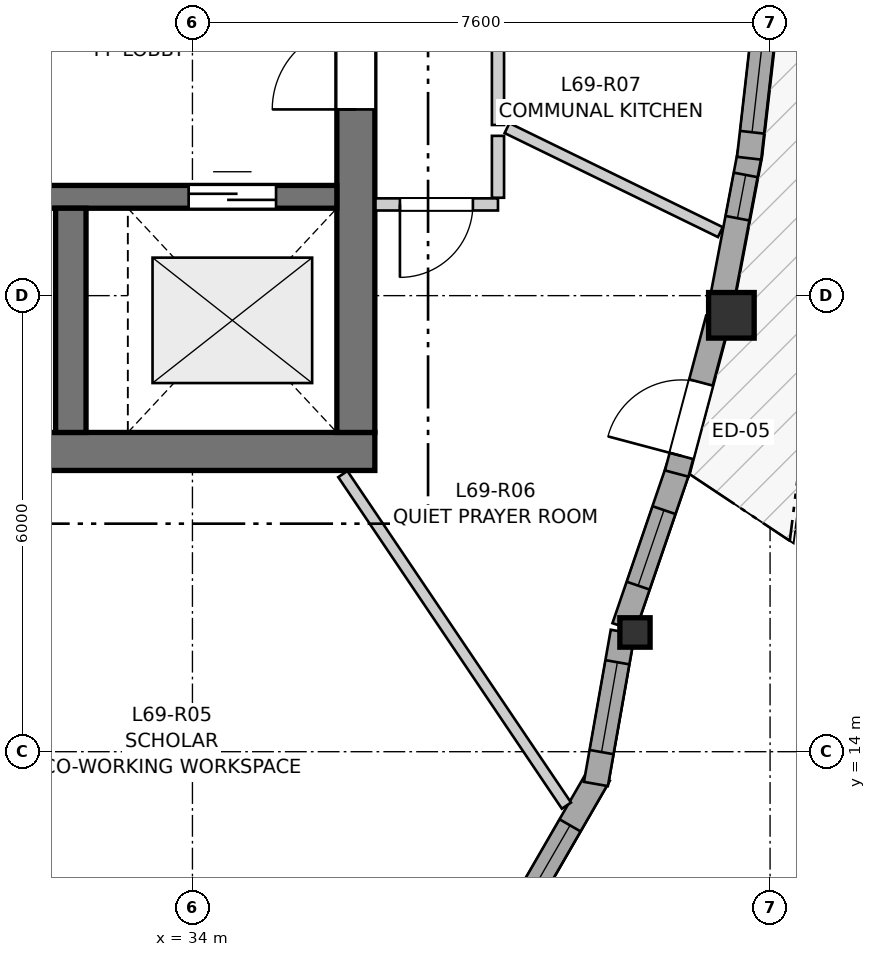
"""IFC4 building model, lengths in metres.
Left out: names, types, materials, properties, quantities, classifications, styles, units other than length and angle.
Written with IfcOpenShell. Run it as: python <this file> out.ifc"""

import sys

from ifc_helpers import new_model, si_unit, direction, frame, frame_2d, origin, origin_2d, place, context, subcontext, project, spatial, rectangle, i_section, extrude, source, transform, mapped, element, fill, save


model = new_model("IFC4")
c1 = context("Model", 3, precision=1e-05, world=origin(), true_north=direction((0.0, 1.0)))
c2 = subcontext(c1, "Body", "Model", "MODEL_VIEW")
j1 = project(units=[si_unit("LENGTHUNIT", "METRE"), si_unit("PLANEANGLEUNIT", "RADIAN")], contexts=[c1])
p1 = place(None, origin())
s1 = spatial("IfcSite", under=j1, at=p1, CompositionType="ELEMENT")
p2 = place(p1, origin())
s2 = spatial("IfcBuilding", under=s1, at=p2, CompositionType="ELEMENT")
p3 = place(p2, frame((0.0, 0.0, 230.8)))
s3 = spatial("IfcBuildingStorey", under=s2, at=p3, CompositionType="ELEMENT", Elevation=230.8)
p4 = place(p3, frame((24.3, 17.95, 0.0), z_axis=(0.0, 0.0, 1.0), x_axis=(1.0, 0.0, 0.0)))
e1 = element("IfcWall", 1, at=p4, inside=s3, PredefinedType="SHEAR", context=c2, shape_type="SweptSolid", body=[
    extrude(rectangle(XDim=12.1, YDim=0.5, at=frame_2d((6.05, 0.0))), origin(), (0.0, 0.0, 1.0), 2.96),
])
p5 = place(p3, frame((36.15, 18.2, 0.0), z_axis=(0.0, 0.0, 1.0), x_axis=(0.0, 1.0, 0.0)))
e2 = element("IfcWall", 2, at=p5, inside=s3, PredefinedType="SHEAR", context=c2, shape_type="SweptSolid", body=[
    extrude(rectangle(XDim=15.6, YDim=0.5, at=frame_2d((7.8, 0.0))), origin(), (0.0, 0.0, 1.0), 2.96),
])
p6 = place(p5, frame((4.25, 0.0, 0.0)))
e3 = element("IfcOpeningElement", 3, at=p6, cuts=e2, PredefinedType="OPENING", context=c2, shape_type="SweptSolid", body=[
    extrude(rectangle(XDim=1.1, YDim=2.15, at=frame_2d((0.55, 1.075))), frame((0.0, 0.26, 0.0), z_axis=(0.0, -1.0, 0.0), x_axis=(1.0, 0.0, 0.0)), (0.0, 0.0, 1.0), 0.52),
])
p7 = place(p5, frame((10.25, 0.0, 0.0)))
e4 = element("IfcOpeningElement", 4, at=p7, cuts=e2, PredefinedType="OPENING", context=c2, shape_type="SweptSolid", body=[
    extrude(rectangle(XDim=1.1, YDim=2.15, at=frame_2d((0.55, 1.075))), frame((0.0, 0.26, 0.0), z_axis=(0.0, -1.0, 0.0), x_axis=(1.0, 0.0, 0.0)), (0.0, 0.0, 1.0), 0.52),
])
p8 = place(p3, frame((24.8, 21.3, 0.0), z_axis=(0.0, 0.0, 1.0), x_axis=(1.0, 0.0, 0.0)))
e5 = element("IfcWall", 5, at=p8, inside=s3, PredefinedType="SHEAR", context=c2, shape_type="SweptSolid", body=[
    extrude(rectangle(XDim=11.1, YDim=0.3, at=frame_2d((5.55, 0.0))), origin(), (0.0, 0.0, 1.0), 2.96),
])
p9 = place(p8, frame((6.22, 0.0, 0.0)))
e6 = element("IfcOpeningElement", 6, at=p9, cuts=e5, PredefinedType="OPENING", context=c2, shape_type="SweptSolid", body=[
    extrude(rectangle(XDim=0.98, YDim=2.15, at=frame_2d((0.49, 1.075))), frame((0.0, 0.16, 0.0), z_axis=(0.0, -1.0, 0.0), x_axis=(1.0, 0.0, 0.0)), (0.0, 0.0, 1.0), 0.32),
])
p10 = place(p8, frame((9.15, 0.0, 0.0)))
e7 = element("IfcOpeningElement", 7, at=p10, cuts=e5, PredefinedType="OPENING", context=c2, shape_type="SweptSolid", body=[
    extrude(rectangle(XDim=1.15, YDim=2.15, at=frame_2d((0.575, 1.075))), frame((0.0, 0.16, 0.0), z_axis=(0.0, -1.0, 0.0), x_axis=(1.0, 0.0, 0.0)), (0.0, 0.0, 1.0), 0.32),
])
p11 = place(p3, frame((32.4, 18.2, 0.0), z_axis=(0.0, 0.0, 1.0), x_axis=(0.0, 1.0, 0.0)))
e8 = element("IfcWall", 8, at=p11, inside=s3, PredefinedType="SHEAR", context=c2, shape_type="SweptSolid", body=[
    extrude(rectangle(XDim=2.95, YDim=0.4, at=frame_2d((1.475, 0.0))), origin(), (0.0, 0.0, 1.0), 2.96),
])
m1 = source(origin(), c2, "Body", "SweptSolid", [
    extrude(i_section(OverallWidth=0.398, OverallDepth=0.387, WebThickness=0.019, FlangeThickness=0.03, FilletRadius=0.015, at=origin_2d()), origin(), (0.0, 0.0, 1.0), 2.96),
])
p12 = place(p3, frame((39.823, 15.569, 0.0), z_axis=(0.0, 0.0, 1.0), x_axis=(1.0, 0.0, 0.0)))
e9 = element("IfcColumn", 9, at=p12, inside=s3, PredefinedType="PILASTER", context=c2, shape_type="MappedRepresentation", body=[
    mapped(m1, transform((0.0, 0.0, 0.0), x_axis=(1.0, 0.0, 0.0), y_axis=(0.0, 1.0, 0.0), z_axis=(0.0, 0.0, 1.0), scale=1.0)),
])
m2 = source(origin(), c2, "Body", "SweptSolid", [
    extrude(rectangle(XDim=0.6, YDim=0.6, at=origin_2d()), origin(), (0.0, 0.0, 1.0), 2.96),
])
p13 = place(p3, frame((41.091, 19.741, 0.0), z_axis=(0.0, 0.0, 1.0), x_axis=(1.0, 0.0, 0.0)))
e10 = element("IfcColumn", 10, at=p13, inside=s3, PredefinedType="COLUMN", context=c2, shape_type="MappedRepresentation", body=[
    mapped(m2, transform((0.0, 0.0, 0.0), x_axis=(1.0, 0.0, 0.0), y_axis=(0.0, 1.0, 0.0), z_axis=(0.0, 0.0, 1.0), scale=1.0)),
])
p14 = place(p3, frame((38.308, 11.888, 0.0), z_axis=(0.0, 0.0, 1.0), x_axis=(0.49990781971, 0.866078617559, 0.0)))
e11 = element("IfcWall", 11, at=p14, inside=s3, PredefinedType="SOLIDWALL", context=c2, shape_type="SweptSolid", body=[
    extrude(rectangle(XDim=2.09, YDim=0.32, at=frame_2d((1.045, 0.0))), origin(), (0.0, 0.0, 1.0), 2.58),
])
p15 = place(p14, frame((0.271, 0.0, 0.82)))
e12 = element("IfcOpeningElement", 12, at=p15, cuts=e11, PredefinedType="OPENING", context=c2, shape_type="SweptSolid", body=[
    extrude(rectangle(XDim=1.05, YDim=1.45, at=frame_2d((0.525, 0.725))), frame((0.0, 0.17, 0.0), z_axis=(0.0, -1.0, 0.0), x_axis=(1.0, 0.0, 0.0)), (0.0, 0.0, 1.0), 0.34),
])
p16 = place(p3, frame((39.309, 13.575, 0.0), z_axis=(0.0, 0.0, 1.0), x_axis=(0.17370309897, 0.984798067326, 0.0)))
e13 = element("IfcWall", 13, at=p16, inside=s3, PredefinedType="SOLIDWALL", context=c2, shape_type="SweptSolid", body=[
    extrude(rectangle(XDim=2.032, YDim=0.32, at=frame_2d((1.016, 0.0))), origin(), (0.0, 0.0, 1.0), 2.58),
])
p17 = place(p16, frame((0.426, 0.0, 0.82)))
e14 = element("IfcOpeningElement", 14, at=p17, cuts=e13, PredefinedType="OPENING", context=c2, shape_type="SweptSolid", body=[
    extrude(rectangle(XDim=1.2, YDim=1.45, at=frame_2d((0.6, 0.725))), frame((0.0, 0.17, 0.0), z_axis=(0.0, -1.0, 0.0), x_axis=(1.0, 0.0, 0.0)), (0.0, 0.0, 1.0), 0.34),
])
p18 = place(p3, frame((39.677, 15.639, 0.0), z_axis=(0.0, 0.0, 1.0), x_axis=(0.323664392341, 0.946171951143, 0.0)))
e15 = element("IfcWall", 15, at=p18, inside=s3, PredefinedType="SOLIDWALL", context=c2, shape_type="SweptSolid", body=[
    extrude(rectangle(XDim=2.223, YDim=0.32, at=frame_2d((1.111, 0.0))), origin(), (0.0, 0.0, 1.0), 2.58),
])
p19 = place(p18, frame((0.576, 0.0, 0.82)))
e16 = element("IfcOpeningElement", 16, at=p19, cuts=e15, PredefinedType="OPENING", context=c2, shape_type="SweptSolid", body=[
    extrude(rectangle(XDim=1.05, YDim=1.45, at=frame_2d((0.525, 0.725))), frame((0.0, 0.17, 0.0), z_axis=(0.0, -1.0, 0.0), x_axis=(1.0, 0.0, 0.0)), (0.0, 0.0, 1.0), 0.34),
])
p20 = place(p3, frame((40.372, 17.659, 0.0), z_axis=(0.0, 0.0, 1.0), x_axis=(0.2570422776, 0.966400159109, 0.0)))
e17 = element("IfcWall", 17, at=p20, inside=s3, PredefinedType="SOLIDWALL", context=c2, shape_type="SweptSolid", body=[
    extrude(rectangle(XDim=2.107, YDim=0.32, at=frame_2d((1.053, 0.0))), origin(), (0.0, 0.0, 1.0), 2.58),
])
p21 = place(p20, frame((0.24, 0.0, 0.0)))
e18 = element("IfcOpeningElement", 18, at=p21, cuts=e17, PredefinedType="OPENING", context=c2, shape_type="SweptSolid", body=[
    extrude(rectangle(XDim=1.0, YDim=2.1, at=frame_2d((0.5, 1.05))), frame((0.0, 0.17, 0.0), z_axis=(0.0, -1.0, 0.0), x_axis=(1.0, 0.0, 0.0)), (0.0, 0.0, 1.0), 0.34),
])
p22 = place(p3, frame((40.95, 19.86, 0.0), z_axis=(0.0, 0.0, 1.0), x_axis=(0.18667884524, 0.982420993638, 0.0)))
e19 = element("IfcWall", 19, at=p22, inside=s3, PredefinedType="SOLIDWALL", context=c2, shape_type="SweptSolid", body=[
    extrude(rectangle(XDim=2.072, YDim=0.32, at=frame_2d((1.036, 0.0))), origin(), (0.0, 0.0, 1.0), 2.58),
])
p23 = place(p22, frame((1.18, 0.0, 0.82)))
e20 = element("IfcOpeningElement", 20, at=p23, cuts=e19, PredefinedType="OPENING", context=c2, shape_type="SweptSolid", body=[
    extrude(rectangle(XDim=0.58, YDim=1.35, at=frame_2d((0.29, 0.675))), frame((0.0, 0.17, 0.0), z_axis=(0.0, -1.0, 0.0), x_axis=(1.0, 0.0, 0.0)), (0.0, 0.0, 1.0), 0.34),
])
p24 = place(p3, frame((41.324, 21.808, 0.0), z_axis=(0.0, 0.0, 1.0), x_axis=(0.113315758547, 0.993559026362, 0.0)))
e21 = element("IfcWall", 21, at=p24, inside=s3, PredefinedType="SOLIDWALL", context=c2, shape_type="SweptSolid", body=[
    extrude(rectangle(XDim=2.118, YDim=0.32, at=frame_2d((1.059, 0.0))), origin(), (0.0, 0.0, 1.0), 2.58),
])
p25 = place(p24, frame((0.344, 0.0, 0.82)))
e22 = element("IfcOpeningElement", 22, at=p25, cuts=e21, PredefinedType="OPENING", context=c2, shape_type="SweptSolid", body=[
    extrude(rectangle(XDim=1.45, YDim=1.25, at=frame_2d((0.725, 0.625))), frame((0.0, 0.17, 0.0), z_axis=(0.0, -1.0, 0.0), x_axis=(1.0, 0.0, 0.0)), (0.0, 0.0, 1.0), 0.34),
])
p26 = place(p3, frame((38.02, 25.659, 0.0), z_axis=(0.0, 0.0, 1.0), x_axis=(0.0, -1.0, 0.0)))
e23 = element("IfcWall", 23, at=p26, inside=s3, PredefinedType="PARTITIONING", context=c2, shape_type="SweptSolid", body=[
    extrude(rectangle(XDim=3.414, YDim=0.16, at=frame_2d((1.707, 0.0))), origin(), (0.0, 0.0, 1.0), 2.628),
])
p27 = place(p26, frame((1.033, 0.0, 0.0)))
e24 = element("IfcOpeningElement", 24, at=p27, cuts=e23, PredefinedType="OPENING", context=c2, shape_type="SweptSolid", body=[
    extrude(rectangle(XDim=1.3, YDim=2.1, at=frame_2d((0.65, 1.05))), frame((0.0, 0.09, 0.0), z_axis=(0.0, -1.0, 0.0), x_axis=(1.0, 0.0, 0.0)), (0.0, 0.0, 1.0), 0.18),
])
p28 = place(p3, frame((38.02, 21.2, 0.0), z_axis=(0.0, 0.0, 1.0), x_axis=(-1.0, 0.0, 0.0)))
e25 = element("IfcWall", 25, at=p28, inside=s3, PredefinedType="PARTITIONING", context=c2, shape_type="SweptSolid", body=[
    extrude(rectangle(XDim=1.612, YDim=0.16, at=frame_2d((0.806, 0.0))), origin(), (0.0, 0.0, 1.0), 2.96),
])
p29 = place(p28, frame((0.33, 0.0, 0.0)))
e26 = element("IfcOpeningElement", 26, at=p29, cuts=e25, PredefinedType="OPENING", context=c2, shape_type="SweptSolid", body=[
    extrude(rectangle(XDim=0.96, YDim=2.1, at=frame_2d((0.48, 1.05))), frame((0.0, 0.09, 0.0), z_axis=(0.0, -1.0, 0.0), x_axis=(1.0, 0.0, 0.0)), (0.0, 0.0, 1.0), 0.18),
])
p30 = place(p3, frame((35.979, 17.653, 0.0), z_axis=(0.0, 0.0, 1.0), x_axis=(0.559125350393, -0.829083133677, 0.0)))
e27 = element("IfcWall", 27, at=p30, inside=s3, PredefinedType="PARTITIONING", context=c2, shape_type="SweptSolid", body=[
    extrude(rectangle(XDim=5.262, YDim=0.145, at=frame_2d((2.631, 0.0))), origin(), (0.0, 0.0, 1.0), 2.96),
])
p31 = place(p3, frame((38.139, 22.204, 0.0), z_axis=(0.0, 0.0, 1.0), x_axis=(0.898869860356, -0.43821567081, 0.0)))
e28 = element("IfcWall", 28, at=p31, inside=s3, PredefinedType="PARTITIONING", context=c2, shape_type="SweptSolid", body=[
    extrude(rectangle(XDim=3.123, YDim=0.145, at=frame_2d((1.562, 0.0))), origin(), (0.0, 0.0, 1.0), 2.96),
])
p32 = place(p3, frame((38.02, 21.288, 0.0), z_axis=(0.0, 0.0, 1.0), x_axis=(0.0, 1.0, 0.0)))
e29 = element("IfcWall", 29, at=p32, inside=s3, PredefinedType="PARTITIONING", context=c2, shape_type="SweptSolid", body=[
    extrude(rectangle(XDim=0.814, YDim=0.16, at=frame_2d((0.407, 0.0))), origin(), (0.0, 0.0, 1.0), 2.628),
])
m3 = source(origin(), c2, "Body", "SweptSolid", [
    extrude(rectangle(XDim=1.05, YDim=1.45, at=frame_2d((0.525, 0.725))), frame((0.0, 0.03, 0.0), z_axis=(0.0, -1.0, 0.0), x_axis=(1.0, 0.0, 0.0)), (0.0, 0.0, 1.0), 0.06),
])
p33 = place(p15, origin())
e30 = element("IfcWindow", 30, at=p33, inside=s3, PartitioningType="SINGLE_PANEL", PredefinedType="WINDOW", context=c2, shape_type="MappedRepresentation", body=[
    mapped(m3, transform((0.0, 0.0, 0.0), x_axis=(1.0, 0.0, 0.0), y_axis=(0.0, 1.0, 0.0), z_axis=(0.0, 0.0, 1.0), scale=1.0)),
])
fill(e12, e30)
m4 = source(origin(), c2, "Body", "SweptSolid", [
    extrude(rectangle(XDim=1.2, YDim=1.45, at=frame_2d((0.6, 0.725))), frame((0.0, 0.03, 0.0), z_axis=(0.0, -1.0, 0.0), x_axis=(1.0, 0.0, 0.0)), (0.0, 0.0, 1.0), 0.06),
])
p34 = place(p17, origin())
e31 = element("IfcWindow", 31, at=p34, inside=s3, PartitioningType="SINGLE_PANEL", PredefinedType="WINDOW", context=c2, shape_type="MappedRepresentation", body=[
    mapped(m4, transform((0.0, 0.0, 0.0), x_axis=(1.0, 0.0, 0.0), y_axis=(0.0, 1.0, 0.0), z_axis=(0.0, 0.0, 1.0), scale=1.0)),
])
fill(e14, e31)
p35 = place(p19, origin())
e32 = element("IfcWindow", 32, at=p35, inside=s3, PartitioningType="SINGLE_PANEL", PredefinedType="WINDOW", context=c2, shape_type="MappedRepresentation", body=[
    mapped(m3, transform((0.0, 0.0, 0.0), x_axis=(1.0, 0.0, 0.0), y_axis=(0.0, 1.0, 0.0), z_axis=(0.0, 0.0, 1.0), scale=1.0)),
])
fill(e16, e32)
m5 = source(origin(), c2, "Body", "SweptSolid", [
    extrude(rectangle(XDim=0.58, YDim=1.35, at=frame_2d((0.29, 0.675))), frame((0.0, 0.03, 0.0), z_axis=(0.0, -1.0, 0.0), x_axis=(1.0, 0.0, 0.0)), (0.0, 0.0, 1.0), 0.06),
])
p36 = place(p23, origin())
e33 = element("IfcWindow", 33, at=p36, inside=s3, PartitioningType="SINGLE_PANEL", PredefinedType="WINDOW", context=c2, shape_type="MappedRepresentation", body=[
    mapped(m5, transform((0.0, 0.0, 0.0), x_axis=(1.0, 0.0, 0.0), y_axis=(0.0, 1.0, 0.0), z_axis=(0.0, 0.0, 1.0), scale=1.0)),
])
fill(e20, e33)
m6 = source(origin(), c2, "Body", "SweptSolid", [
    extrude(rectangle(XDim=1.45, YDim=1.25, at=frame_2d((0.725, 0.625))), frame((0.0, 0.03, 0.0), z_axis=(0.0, -1.0, 0.0), x_axis=(1.0, 0.0, 0.0)), (0.0, 0.0, 1.0), 0.06),
])
p37 = place(p25, origin())
e34 = element("IfcWindow", 34, at=p37, inside=s3, PartitioningType="SINGLE_PANEL", PredefinedType="WINDOW", context=c2, shape_type="MappedRepresentation", body=[
    mapped(m6, transform((0.0, 0.0, 0.0), x_axis=(1.0, 0.0, 0.0), y_axis=(0.0, 1.0, 0.0), z_axis=(0.0, 0.0, 1.0), scale=1.0)),
])
fill(e22, e34)
m7 = source(origin(), c2, "Body", "SweptSolid", [
    extrude(rectangle(XDim=1.0, YDim=2.1, at=frame_2d((0.5, 1.05))), frame((0.0, 0.025, 0.0), z_axis=(0.0, -1.0, 0.0), x_axis=(1.0, 0.0, 0.0)), (0.0, 0.0, 1.0), 0.05),
])
p38 = place(p21, origin())
e35 = element("IfcDoor", 35, at=p38, inside=s3, OperationType="SINGLE_SWING_LEFT", PredefinedType="DOOR", context=c2, shape_type="MappedRepresentation", body=[
    mapped(m7, transform((0.0, 0.0, 0.0), x_axis=(1.0, 0.0, 0.0), y_axis=(0.0, 1.0, 0.0), z_axis=(0.0, 0.0, 1.0), scale=1.0)),
])
fill(e18, e35)
m8 = source(origin(), c2, "Body", "SweptSolid", [
    extrude(rectangle(XDim=1.15, YDim=2.15, at=frame_2d((0.575, 1.075))), frame((0.0, 0.025, 0.0), z_axis=(0.0, -1.0, 0.0), x_axis=(1.0, 0.0, 0.0)), (0.0, 0.0, 1.0), 0.05),
])
p39 = place(p10, origin())
e36 = element("IfcDoor", 36, at=p39, inside=s3, OperationType="DOUBLE_DOOR_SLIDING", PredefinedType="DOOR", context=c2, shape_type="MappedRepresentation", body=[
    mapped(m8, transform((0.0, 0.0, 0.0), x_axis=(1.0, 0.0, 0.0), y_axis=(0.0, 1.0, 0.0), z_axis=(0.0, 0.0, 1.0), scale=1.0)),
])
fill(e7, e36)
m9 = source(origin(), c2, "Body", "SweptSolid", [
    extrude(rectangle(XDim=1.1, YDim=2.15, at=frame_2d((0.55, 1.075))), frame((0.0, 0.025, 0.0), z_axis=(0.0, -1.0, 0.0), x_axis=(1.0, 0.0, 0.0)), (0.0, 0.0, 1.0), 0.05),
])
p40 = place(p6, origin())
e37 = element("IfcDoor", 37, at=p40, inside=s3, OperationType="SINGLE_SWING_LEFT", PredefinedType="DOOR", context=c2, shape_type="MappedRepresentation", body=[
    mapped(m9, transform((0.0, 0.0, 0.0), x_axis=(1.0, 0.0, 0.0), y_axis=(0.0, 1.0, 0.0), z_axis=(0.0, 0.0, 1.0), scale=1.0)),
])
fill(e3, e37)
m10 = source(origin(), c2, "Body", "SweptSolid", [
    extrude(rectangle(XDim=0.96, YDim=2.1, at=frame_2d((0.48, 1.05))), frame((0.0, 0.025, 0.0), z_axis=(0.0, -1.0, 0.0), x_axis=(1.0, 0.0, 0.0)), (0.0, 0.0, 1.0), 0.05),
])
p41 = place(p29, origin())
e38 = element("IfcDoor", 38, at=p41, inside=s3, OperationType="SINGLE_SWING_RIGHT", PredefinedType="DOOR", context=c2, shape_type="MappedRepresentation", body=[
    mapped(m10, transform((0.0, 0.0, 0.0), x_axis=(1.0, 0.0, 0.0), y_axis=(0.0, 1.0, 0.0), z_axis=(0.0, 0.0, 1.0), scale=1.0)),
])
fill(e26, e38)
save(model, sys.argv[1])
